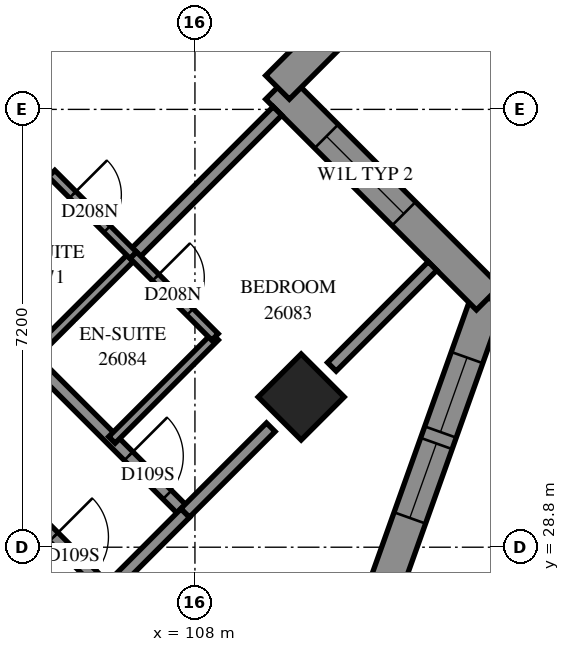
"""IFC4 building model, lengths in metres.
Left out: names, types, materials, properties, quantities, classifications, styles, units other than length and angle.
Written with IfcOpenShell. Run it as: python <this file> out.ifc"""

import sys

from ifc_helpers import new_model, si_unit, direction, frame, frame_2d, origin, origin_2d, place, context, subcontext, project, spatial, polyline, rectangle, outline, extrude, element, fill, save


model = new_model("IFC4")
c1 = context("Model", 3, precision=1e-05, world=origin(), true_north=direction((0.0, 1.0)))
c2 = subcontext(c1, "Body", "Model", "MODEL_VIEW")
j1 = project(units=[si_unit("LENGTHUNIT", "METRE"), si_unit("PLANEANGLEUNIT", "RADIAN")], contexts=[c1])
p1 = place(None, origin())
s1 = spatial("IfcSite", under=j1, at=p1, CompositionType="ELEMENT")
p2 = place(p1, origin())
s2 = spatial("IfcBuilding", under=s1, at=p2, CompositionType="ELEMENT")
p3 = place(p2, frame((0.0, 0.0, 98.2)))
s3 = spatial("IfcBuildingStorey", under=s2, at=p3, CompositionType="ELEMENT", Elevation=98.2)
p4 = place(p3, frame((109.747, 31.271, 0.0), z_axis=(0.0, 0.0, 1.0), x_axis=(0.7071067812, -0.7071067812, 0.0)))
e1 = element("IfcColumn", 1, at=p4, inside=s3, PredefinedType="COLUMN", context=c2, shape_type="SweptSolid", body=[
    extrude(rectangle(XDim=1.0, YDim=1.0, at=origin_2d()), origin(), (0.0, 0.0, 1.0), 3.1),
])
p5 = place(p3, frame((111.041, 27.901, 0.0), z_axis=(0.0, 0.0, 1.0), x_axis=(0.3360509292, 0.9418438156, 0.0)))
e2 = element("IfcWall", 2, at=p5, inside=s3, PredefinedType="SOLIDWALL", context=c2, shape_type="SweptSolid", body=[
    extrude(outline(polyline([(-0.125, -0.275), (5.478, -0.275), (5.13, 0.275), (0.125, 0.275), (-0.125, -0.275)])), origin(), (0.0, 0.0, 1.0), 3.1),
])
p6 = place(p5, frame((1.466, 0.0, 0.5)))
e3 = element("IfcOpeningElement", 3, at=p6, cuts=e2, PredefinedType="OPENING", context=c2, shape_type="SweptSolid", body=[
    extrude(rectangle(XDim=1.3, YDim=2.45, at=frame_2d((0.65, 1.225))), frame((0.0, 0.285, 0.0), z_axis=(0.0, -1.0, 0.0), x_axis=(1.0, 0.0, 0.0)), (0.0, 0.0, 1.0), 0.57),
])
p7 = place(p5, frame((2.966, 0.0, 0.5)))
e4 = element("IfcOpeningElement", 4, at=p7, cuts=e2, PredefinedType="OPENING", context=c2, shape_type="SweptSolid", body=[
    extrude(rectangle(XDim=1.3, YDim=2.45, at=frame_2d((0.65, 1.225))), frame((0.0, 0.285, 0.0), z_axis=(0.0, -1.0, 0.0), x_axis=(1.0, 0.0, 0.0)), (0.0, 0.0, 1.0), 0.57),
])
p8 = place(p3, frame((112.824, 32.896, 0.0), z_axis=(0.0, 0.0, 1.0), x_axis=(-0.7071067812, 0.7071067812, 0.0)))
e5 = element("IfcWall", 5, at=p8, inside=s3, PredefinedType="SOLIDWALL", context=c2, shape_type="SweptSolid", body=[
    extrude(outline(polyline([(-0.174, -0.275), (4.626, -0.275), (5.176, 0.275), (0.174, 0.275), (-0.174, -0.275)])), origin(), (0.0, 0.0, 1.0), 3.1),
])
p9 = place(p8, frame((1.964, 0.0, 0.6)))
e6 = element("IfcOpeningElement", 6, at=p9, cuts=e5, PredefinedType="OPENING", context=c2, shape_type="SweptSolid", body=[
    extrude(rectangle(XDim=1.8, YDim=1.9, at=frame_2d((0.9, 0.95))), frame((0.0, 0.285, 0.0), z_axis=(0.0, -1.0, 0.0), x_axis=(1.0, 0.0, 0.0)), (0.0, 0.0, 1.0), 0.57),
])
p10 = place(p3, frame((109.358, 36.362, 0.0), z_axis=(0.0, 0.0, 1.0), x_axis=(0.7071067812, 0.7071067812, 0.0)))
e7 = element("IfcWall", 7, at=p10, inside=s3, PredefinedType="SOLIDWALL", context=c2, shape_type="SweptSolid", body=[
    extrude(outline(polyline([(0.275, -0.275), (6.126, -0.275), (5.381, 0.275), (-0.275, 0.275), (0.275, -0.275)])), origin(), (0.0, 0.0, 1.0), 3.1),
])
p11 = place(p10, frame((1.137, 0.0, 0.6)))
e8 = element("IfcOpeningElement", 8, at=p11, cuts=e7, PredefinedType="OPENING", context=c2, shape_type="SweptSolid", body=[
    extrude(rectangle(XDim=1.8, YDim=1.9, at=frame_2d((0.9, 0.95))), frame((0.0, 0.285, 0.0), z_axis=(0.0, -1.0, 0.0), x_axis=(1.0, 0.0, 0.0)), (0.0, 0.0, 1.0), 0.57),
])
p12 = place(p3, frame((93.339, 41.309, 0.0), z_axis=(0.0, 0.0, 1.0), x_axis=(0.7071067812, -0.7071067812, 0.0)))
e9 = element("IfcWall", 9, at=p12, inside=s3, PredefinedType="PARTITIONING", context=c2, shape_type="SweptSolid", body=[
    extrude(rectangle(XDim=18.702, YDim=0.2, at=frame_2d((9.351, 0.0))), origin(), (0.0, 0.0, 1.0), 3.1),
])
p13 = place(p12, frame((3.05, 0.0, 0.0)))
e10 = element("IfcOpeningElement", 10, at=p13, cuts=e9, PredefinedType="OPENING", context=c2, shape_type="SweptSolid", body=[
    extrude(rectangle(XDim=0.9, YDim=2.1, at=frame_2d((0.45, 1.05))), frame((0.0, 0.11, 0.0), z_axis=(0.0, -1.0, 0.0), x_axis=(1.0, 0.0, 0.0)), (0.0, 0.0, 1.0), 0.22),
])
p14 = place(p12, frame((4.7, 0.0, 0.0)))
e11 = element("IfcOpeningElement", 11, at=p14, cuts=e9, PredefinedType="OPENING", context=c2, shape_type="SweptSolid", body=[
    extrude(rectangle(XDim=0.9, YDim=2.1, at=frame_2d((0.45, 1.05))), frame((0.0, 0.11, 0.0), z_axis=(0.0, -1.0, 0.0), x_axis=(1.0, 0.0, 0.0)), (0.0, 0.0, 1.0), 0.22),
])
p15 = place(p12, frame((10.149, 0.0, 0.0)))
e12 = element("IfcOpeningElement", 12, at=p15, cuts=e9, PredefinedType="OPENING", context=c2, shape_type="SweptSolid", body=[
    extrude(rectangle(XDim=0.9, YDim=2.1, at=frame_2d((0.45, 1.05))), frame((0.0, 0.11, 0.0), z_axis=(0.0, -1.0, 0.0), x_axis=(1.0, 0.0, 0.0)), (0.0, 0.0, 1.0), 0.22),
])
p16 = place(p12, frame((11.9, 0.0, 0.0)))
e13 = element("IfcOpeningElement", 13, at=p16, cuts=e9, PredefinedType="OPENING", context=c2, shape_type="SweptSolid", body=[
    extrude(rectangle(XDim=0.9, YDim=2.1, at=frame_2d((0.45, 1.05))), frame((0.0, 0.11, 0.0), z_axis=(0.0, -1.0, 0.0), x_axis=(1.0, 0.0, 0.0)), (0.0, 0.0, 1.0), 0.22),
])
p17 = place(p12, frame((17.45, 0.0, 0.0)))
e14 = element("IfcOpeningElement", 14, at=p17, cuts=e9, PredefinedType="OPENING", context=c2, shape_type="SweptSolid", body=[
    extrude(rectangle(XDim=0.9, YDim=2.1, at=frame_2d((0.45, 1.05))), frame((0.0, 0.11, 0.0), z_axis=(0.0, -1.0, 0.0), x_axis=(1.0, 0.0, 0.0)), (0.0, 0.0, 1.0), 0.22),
])
p18 = place(p3, frame((105.155, 36.863, 0.0), z_axis=(0.0, 0.0, 1.0), x_axis=(0.7071067812, 0.7071067812, 0.0)))
e15 = element("IfcWall", 15, at=p18, inside=s3, PredefinedType="PARTITIONING", context=c2, shape_type="SweptSolid", body=[
    extrude(rectangle(XDim=5.787, YDim=0.2, at=frame_2d((2.893, 0.0))), origin(), (0.0, 0.0, 1.0), 3.1),
])
p19 = place(p3, frame((104.023, 33.184, 0.0), z_axis=(0.0, 0.0, 1.0), x_axis=(0.7071067812, -0.7071067812, 0.0)))
e16 = element("IfcWall", 16, at=p19, inside=s3, PredefinedType="PARTITIONING", context=c2, shape_type="SweptSolid", body=[
    extrude(rectangle(XDim=5.399, YDim=0.2, at=frame_2d((2.7, 0.0))), origin(), (0.0, 0.0, 1.0), 3.1),
])
p20 = place(p19, frame((4.08, 0.0, 0.0)))
e17 = element("IfcOpeningElement", 17, at=p20, cuts=e16, PredefinedType="OPENING", context=c2, shape_type="SweptSolid", body=[
    extrude(rectangle(XDim=0.9, YDim=2.1, at=frame_2d((0.45, 1.05))), frame((0.0, 0.11, 0.0), z_axis=(0.0, -1.0, 0.0), x_axis=(1.0, 0.0, 0.0)), (0.0, 0.0, 1.0), 0.22),
])
p21 = place(p3, frame((106.989, 33.605, 0.0), z_axis=(0.0, 0.0, 1.0), x_axis=(0.7071067812, 0.7071067812, 0.0)))
e18 = element("IfcWall", 18, at=p21, inside=s3, PredefinedType="PARTITIONING", context=c2, shape_type="SweptSolid", body=[
    extrude(rectangle(XDim=3.35, YDim=0.2, at=frame_2d((1.675, 0.0))), origin(), (0.0, 0.0, 1.0), 3.1),
])
p22 = place(p3, frame((105.29, 31.91, 0.0), z_axis=(0.0, 0.0, 1.0), x_axis=(0.7075233388, 0.706689978, 0.0)))
e19 = element("IfcWall", 19, at=p22, inside=s3, PredefinedType="PARTITIONING", context=c2, shape_type="SweptSolid", body=[
    extrude(rectangle(XDim=2.4, YDim=0.15, at=frame_2d((1.2, 0.0))), origin(), (0.0, 0.0, 1.0), 3.1),
])
for number, where, z_axis, x_axis in (
    (20, (106.635, 30.565, 0.0), (0.0, 0.0, 1.0), (0.707, 0.707, 0.0)),
    (21, (103.949, 33.253, 0.0), (0.0, 0.0, 1.0), (0.707, 0.707, 0.0)),
):
    element("IfcWall", number, at=place(p3, frame(where, z_axis=z_axis, x_axis=x_axis)), inside=s3, PredefinedType="PARTITIONING", context=c2, shape_type="SweptSolid", body=[
        extrude(rectangle(XDim=2.398, YDim=0.15, at=frame_2d((1.199, 0.0))), origin(), (0.0, 0.0, 1.0), 3.1),
    ])
p23 = place(p3, frame((110.251, 31.767, 0.0), z_axis=(0.0, 0.0, 1.0), x_axis=(0.7066584143, 0.7075548639, 0.0)))
e22 = element("IfcWall", 22, at=p23, inside=s3, PredefinedType="PARTITIONING", context=c2, shape_type="SweptSolid", body=[
    extrude(rectangle(XDim=2.343, YDim=0.2, at=frame_2d((1.171, 0.0))), origin(), (0.0, 0.0, 1.0), 3.1),
])
p24 = place(p3, frame((107.837, 29.363, 0.0), z_axis=(0.0, 0.0, 1.0), x_axis=(0.7071067812, 0.7071067812, 0.0)))
e23 = element("IfcWall", 23, at=p24, inside=s3, PredefinedType="PARTITIONING", context=c2, shape_type="SweptSolid", body=[
    extrude(rectangle(XDim=1.994, YDim=0.2, at=frame_2d((0.997, 0.0))), origin(), (0.0, 0.0, 1.0), 2.6),
])
p25 = place(p3, frame((105.642, 34.944, 0.0), z_axis=(0.0, 0.0, 1.0), x_axis=(0.7071067812, -0.7071067812, 0.0)))
e24 = element("IfcWall", 24, at=p25, inside=s3, PredefinedType="PARTITIONING", context=c2, shape_type="SweptSolid", body=[
    extrude(rectangle(XDim=1.901, YDim=0.15, at=frame_2d((0.95, 0.0))), origin(), (0.0, 0.0, 1.0), 3.1),
])
p26 = place(p25, frame((0.491, 0.0, 0.0)))
e25 = element("IfcOpeningElement", 25, at=p26, cuts=e24, PredefinedType="OPENING", context=c2, shape_type="SweptSolid", body=[
    extrude(rectangle(XDim=0.8, YDim=2.1, at=frame_2d((0.4, 1.05))), frame((0.0, 0.085, 0.0), z_axis=(0.0, -1.0, 0.0), x_axis=(1.0, 0.0, 0.0)), (0.0, 0.0, 1.0), 0.17),
])
p27 = place(p3, frame((106.987, 33.602, 0.0), z_axis=(0.0, 0.0, 1.0), x_axis=(0.7065800724, -0.7076330979, 0.0)))
e26 = element("IfcWall", 26, at=p27, inside=s3, PredefinedType="PARTITIONING", context=c2, shape_type="SweptSolid", body=[
    extrude(rectangle(XDim=1.899, YDim=0.15, at=frame_2d((0.95, 0.0))), origin(), (0.0, 0.0, 1.0), 3.1),
])
p28 = place(p27, frame((0.519, 0.0, 0.0)))
e27 = element("IfcOpeningElement", 27, at=p28, cuts=e26, PredefinedType="OPENING", context=c2, shape_type="SweptSolid", body=[
    extrude(rectangle(XDim=0.8, YDim=2.1, at=frame_2d((0.4, 1.05))), frame((0.0, 0.085, 0.0), z_axis=(0.0, -1.0, 0.0), x_axis=(1.0, 0.0, 0.0)), (0.0, 0.0, 1.0), 0.17),
])
p29 = place(p3, frame((106.568, 28.086, 0.0), z_axis=(0.0, 0.0, 1.0), x_axis=(0.7065510983, 0.7076620277, 0.0)))
e28 = element("IfcWall", 28, at=p29, inside=s3, PredefinedType="PARTITIONING", context=c2, shape_type="SweptSolid", body=[
    extrude(rectangle(XDim=1.8, YDim=0.2, at=frame_2d((0.9, 0.0))), origin(), (0.0, 0.0, 1.0), 2.6),
])
p30 = place(p6, origin())
e29 = element("IfcWindow", 29, at=p30, inside=s3, PartitioningType="SINGLE_PANEL", PredefinedType="WINDOW", context=c2, shape_type="SweptSolid", body=[
    extrude(rectangle(XDim=1.3, YDim=2.45, at=frame_2d((0.65, 1.225))), frame((0.0, 0.155, 0.0), z_axis=(0.0, -1.0, 0.0), x_axis=(1.0, 0.0, 0.0)), (0.0, 0.0, 1.0), 0.06),
])
fill(e3, e29)
p31 = place(p7, origin())
e30 = element("IfcWindow", 30, at=p31, inside=s3, PartitioningType="SINGLE_PANEL", PredefinedType="WINDOW", context=c2, shape_type="SweptSolid", body=[
    extrude(rectangle(XDim=1.3, YDim=2.45, at=frame_2d((0.65, 1.225))), frame((0.0, 0.155, 0.0), z_axis=(0.0, -1.0, 0.0), x_axis=(1.0, 0.0, 0.0)), (0.0, 0.0, 1.0), 0.06),
])
fill(e4, e30)
p32 = place(p9, origin())
e31 = element("IfcWindow", 31, at=p32, inside=s3, PartitioningType="SINGLE_PANEL", PredefinedType="WINDOW", context=c2, shape_type="SweptSolid", body=[
    extrude(rectangle(XDim=1.8, YDim=1.9, at=frame_2d((0.9, 0.95))), frame((0.0, 0.155, 0.0), z_axis=(0.0, -1.0, 0.0), x_axis=(1.0, 0.0, 0.0)), (0.0, 0.0, 1.0), 0.06),
])
fill(e6, e31)
p33 = place(p26, origin())
e32 = element("IfcDoor", 32, at=p33, inside=s3, OperationType="SINGLE_SWING_RIGHT", PredefinedType="DOOR", context=c2, shape_type="SweptSolid", body=[
    extrude(rectangle(XDim=0.8, YDim=2.1, at=frame_2d((0.4, 1.05))), frame((0.0, 0.025, 0.0), z_axis=(0.0, -1.0, 0.0), x_axis=(1.0, 0.0, 0.0)), (0.0, 0.0, 1.0), 0.05),
])
fill(e25, e32)
p34 = place(p17, origin())
e33 = element("IfcDoor", 33, at=p34, inside=s3, OperationType="SINGLE_SWING_LEFT", PredefinedType="DOOR", context=c2, shape_type="SweptSolid", body=[
    extrude(rectangle(XDim=0.9, YDim=2.1, at=frame_2d((0.45, 1.05))), frame((0.0, 0.025, 0.0), z_axis=(0.0, -1.0, 0.0), x_axis=(1.0, 0.0, 0.0)), (0.0, 0.0, 1.0), 0.05),
])
fill(e14, e33)
p35 = place(p20, origin())
e34 = element("IfcDoor", 34, at=p35, inside=s3, OperationType="SINGLE_SWING_RIGHT", PredefinedType="DOOR", context=c2, shape_type="SweptSolid", body=[
    extrude(rectangle(XDim=0.9, YDim=2.1, at=frame_2d((0.45, 1.05))), frame((0.0, 0.025, 0.0), z_axis=(0.0, -1.0, 0.0), x_axis=(1.0, 0.0, 0.0)), (0.0, 0.0, 1.0), 0.05),
])
fill(e17, e34)
p36 = place(p28, origin())
e35 = element("IfcDoor", 35, at=p36, inside=s3, OperationType="SINGLE_SWING_RIGHT", PredefinedType="DOOR", context=c2, shape_type="SweptSolid", body=[
    extrude(rectangle(XDim=0.8, YDim=2.1, at=frame_2d((0.4, 1.05))), frame((0.0, 0.025, 0.0), z_axis=(0.0, -1.0, 0.0), x_axis=(1.0, 0.0, 0.0)), (0.0, 0.0, 1.0), 0.05),
])
fill(e27, e35)
save(model, sys.argv[1])
